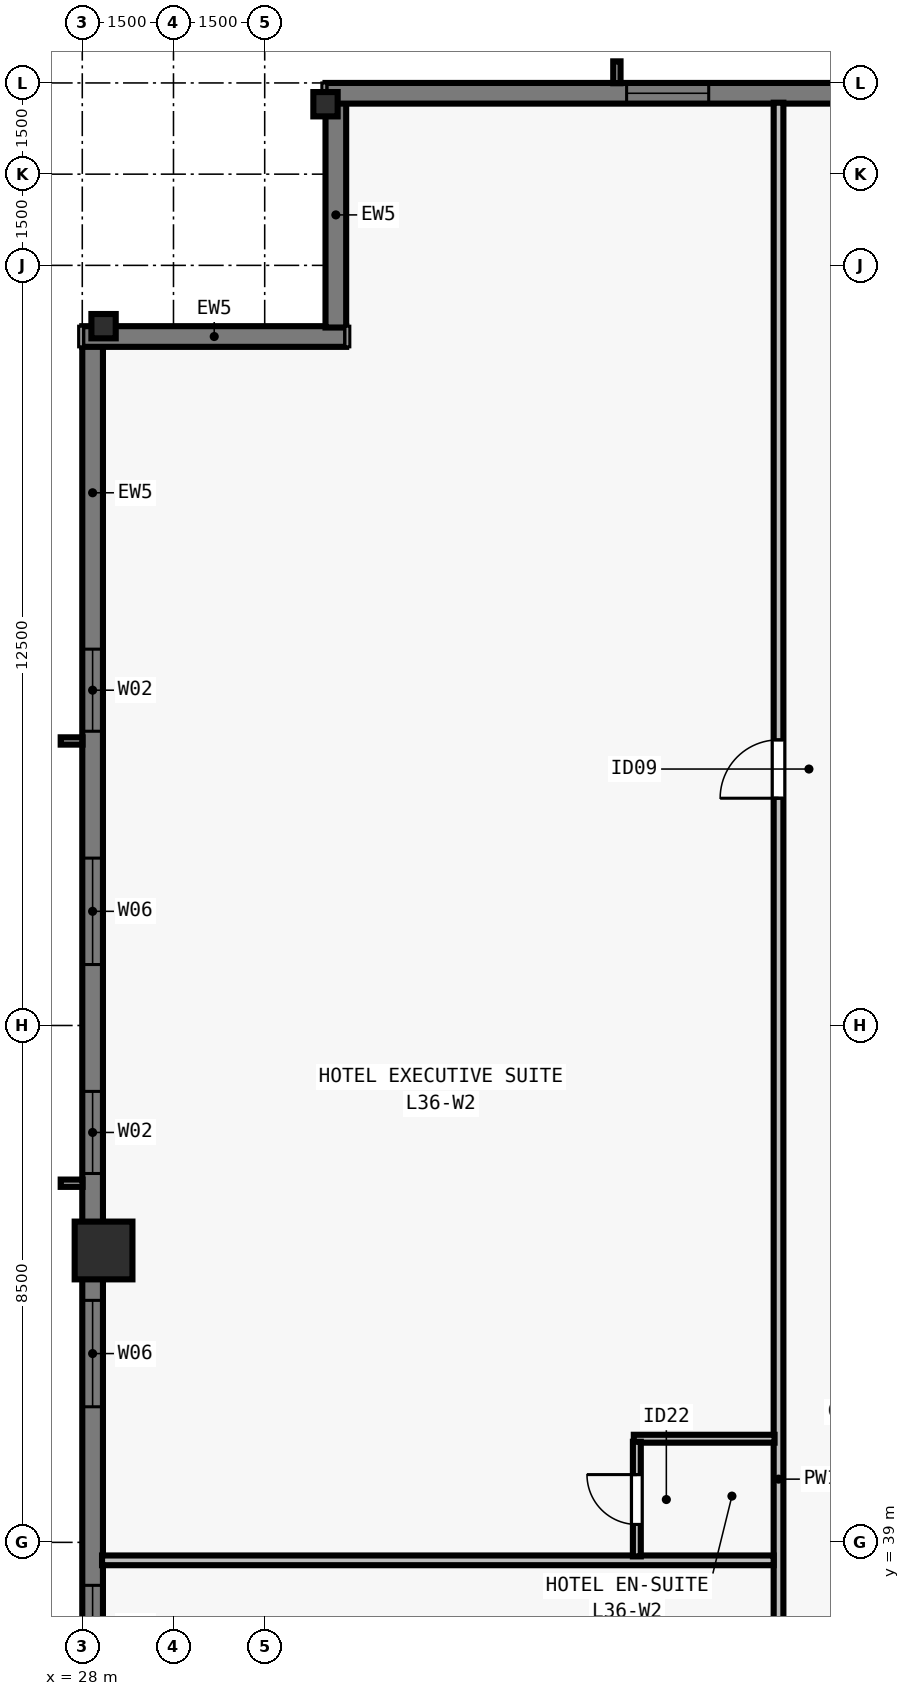
"""IFC4 building model, lengths in metres.
Left out: names, types, materials, properties, quantities, classifications, styles, units other than length and angle.
Written with IfcOpenShell. Run it as: python <this file> out.ifc"""

import sys

from ifc_helpers import new_model, si_unit, direction, frame, frame_2d, origin, origin_2d, place, context, subcontext, project, spatial, rectangle, i_section, extrude, element, fill, save


model = new_model("IFC4")
c1 = context("Model", 3, precision=1e-05, world=origin(), true_north=direction((0.0, 1.0)))
c2 = subcontext(c1, "Body", "Model", "MODEL_VIEW")
j1 = project(units=[si_unit("LENGTHUNIT", "METRE"), si_unit("PLANEANGLEUNIT", "RADIAN")], contexts=[c1])
p1 = place(None, origin())
s1 = spatial("IfcSite", under=j1, at=p1, CompositionType="ELEMENT")
p2 = place(p1, origin())
s2 = spatial("IfcBuilding", under=s1, at=p2, CompositionType="ELEMENT")
p3 = place(p2, frame((0.0, 0.0, 134.0)))
s3 = spatial("IfcBuildingStorey", under=s2, at=p3, CompositionType="ELEMENT", Elevation=134.0)
for number, where, z_axis, x_axis in (
    (1, (32.0, 62.65, 0.0), (0.0, 0.0, 1.0), (1.0, 0.0, 0.0)),
    (2, (28.35, 59.0, 0.0), (0.0, 0.0, 1.0), (0.0, 1.0, 0.0)),
):
    element("IfcColumn", number, at=place(p3, frame(where, z_axis=z_axis, x_axis=x_axis)), inside=s3, PredefinedType="COLUMN", context=c2, shape_type="SweptSolid", body=[
        extrude(i_section(OverallWidth=0.4, OverallDepth=0.4, WebThickness=0.022, FlangeThickness=0.036, at=origin_2d()), origin(), (0.0, 0.0, 1.0), 3.5),
    ])
p4 = place(p3, frame((28.35, 43.8, 0.0), z_axis=(0.0, 0.0, 1.0), x_axis=(0.0, 1.0, 0.0)))
e3 = element("IfcColumn", 3, at=p4, inside=s3, PredefinedType="COLUMN", context=c2, shape_type="SweptSolid", body=[
    extrude(rectangle(XDim=0.95, YDim=0.95, at=origin_2d()), origin(), (0.0, 0.0, 1.0), 3.5),
])
p5 = place(p3, frame((28.17, 32.8, 0.0), z_axis=(0.0, 0.0, 1.0), x_axis=(0.0, 1.0, 0.0)))
e4 = element("IfcWall", 4, at=p5, inside=s3, PredefinedType="SOLIDWALL", context=c2, shape_type="SweptSolid", body=[
    extrude(rectangle(XDim=25.882, YDim=0.34, at=frame_2d((12.941, 0.0))), origin(), (0.0, 0.0, 1.0), 3.28),
])
p6 = place(p5, frame((4.143, 0.0, 0.8)))
e5 = element("IfcOpeningElement", 5, at=p6, cuts=e4, PredefinedType="OPENING", context=c2, shape_type="SweptSolid", body=[
    extrude(rectangle(XDim=1.35, YDim=1.66, at=frame_2d((0.675, 0.83))), frame((0.0, 0.18, 0.0), z_axis=(0.0, -1.0, 0.0), x_axis=(1.0, 0.0, 0.0)), (0.0, 0.0, 1.0), 0.36),
])
p7 = place(p5, frame((8.43, 0.0, 0.8)))
e6 = element("IfcOpeningElement", 6, at=p7, cuts=e4, PredefinedType="OPENING", context=c2, shape_type="SweptSolid", body=[
    extrude(rectangle(XDim=1.75, YDim=1.66, at=frame_2d((0.875, 0.83))), frame((0.0, 0.18, 0.0), z_axis=(0.0, -1.0, 0.0), x_axis=(1.0, 0.0, 0.0)), (0.0, 0.0, 1.0), 0.36),
])
p8 = place(p5, frame((12.266, 0.0, 0.8)))
e7 = element("IfcOpeningElement", 7, at=p8, cuts=e4, PredefinedType="OPENING", context=c2, shape_type="SweptSolid", body=[
    extrude(rectangle(XDim=1.35, YDim=1.66, at=frame_2d((0.675, 0.83))), frame((0.0, 0.18, 0.0), z_axis=(0.0, -1.0, 0.0), x_axis=(1.0, 0.0, 0.0)), (0.0, 0.0, 1.0), 0.36),
])
p9 = place(p5, frame((15.702, 0.0, 0.8)))
e8 = element("IfcOpeningElement", 8, at=p9, cuts=e4, PredefinedType="OPENING", context=c2, shape_type="SweptSolid", body=[
    extrude(rectangle(XDim=1.75, YDim=1.66, at=frame_2d((0.875, 0.83))), frame((0.0, 0.18, 0.0), z_axis=(0.0, -1.0, 0.0), x_axis=(1.0, 0.0, 0.0)), (0.0, 0.0, 1.0), 0.36),
])
p10 = place(p5, frame((19.539, 0.0, 0.8)))
e9 = element("IfcOpeningElement", 9, at=p10, cuts=e4, PredefinedType="OPENING", context=c2, shape_type="SweptSolid", body=[
    extrude(rectangle(XDim=1.35, YDim=1.66, at=frame_2d((0.675, 0.83))), frame((0.0, 0.18, 0.0), z_axis=(0.0, -1.0, 0.0), x_axis=(1.0, 0.0, 0.0)), (0.0, 0.0, 1.0), 0.36),
])
p11 = place(p3, frame((28.0, 58.83, 0.0), z_axis=(0.0, 0.0, 1.0), x_axis=(1.0, 0.0, 0.0)))
e10 = element("IfcWall", 10, at=p11, inside=s3, PredefinedType="SOLIDWALL", context=c2, shape_type="SweptSolid", body=[
    extrude(rectangle(XDim=4.34, YDim=0.34, at=frame_2d((2.17, 0.0))), origin(), (0.0, 0.0, 1.0), 3.28),
])
p12 = place(p3, frame((32.17, 58.978, 0.0), z_axis=(0.0, 0.0, 1.0), x_axis=(0.0, 1.0, 0.0)))
e11 = element("IfcWall", 11, at=p12, inside=s3, PredefinedType="SOLIDWALL", context=c2, shape_type="SweptSolid", body=[
    extrude(rectangle(XDim=3.704, YDim=0.34, at=frame_2d((1.852, 0.0))), origin(), (0.0, 0.0, 1.0), 3.28),
])
p13 = place(p3, frame((32.0, 62.83, 0.0), z_axis=(0.0, 0.0, 1.0), x_axis=(1.0, 0.0, 0.0)))
e12 = element("IfcWall", 12, at=p13, inside=s3, PredefinedType="SOLIDWALL", context=c2, shape_type="SweptSolid", body=[
    extrude(rectangle(XDim=39.682, YDim=0.34, at=frame_2d((19.841, 0.0))), origin(), (0.0, 0.0, 1.0), 3.28),
])
p14 = place(p13, frame((4.952, 0.0, 0.8)))
e13 = element("IfcOpeningElement", 13, at=p14, cuts=e12, PredefinedType="OPENING", context=c2, shape_type="SweptSolid", body=[
    extrude(rectangle(XDim=1.35, YDim=1.66, at=frame_2d((0.675, 0.83))), frame((0.0, 0.18, 0.0), z_axis=(0.0, -1.0, 0.0), x_axis=(1.0, 0.0, 0.0)), (0.0, 0.0, 1.0), 0.36),
])
p15 = place(p13, frame((12.059, 0.0, 0.8)))
e14 = element("IfcOpeningElement", 14, at=p15, cuts=e12, PredefinedType="OPENING", context=c2, shape_type="SweptSolid", body=[
    extrude(rectangle(XDim=1.35, YDim=1.66, at=frame_2d((0.675, 0.83))), frame((0.0, 0.18, 0.0), z_axis=(0.0, -1.0, 0.0), x_axis=(1.0, 0.0, 0.0)), (0.0, 0.0, 1.0), 0.36),
])
p16 = place(p13, frame((16.262, 0.0, 0.8)))
e15 = element("IfcOpeningElement", 15, at=p16, cuts=e12, PredefinedType="OPENING", context=c2, shape_type="SweptSolid", body=[
    extrude(rectangle(XDim=1.75, YDim=1.66, at=frame_2d((0.875, 0.83))), frame((0.0, 0.18, 0.0), z_axis=(0.0, -1.0, 0.0), x_axis=(1.0, 0.0, 0.0)), (0.0, 0.0, 1.0), 0.36),
])
p17 = place(p13, frame((19.166, 0.0, 0.8)))
e16 = element("IfcOpeningElement", 16, at=p17, cuts=e12, PredefinedType="OPENING", context=c2, shape_type="SweptSolid", body=[
    extrude(rectangle(XDim=1.35, YDim=1.66, at=frame_2d((0.675, 0.83))), frame((0.0, 0.18, 0.0), z_axis=(0.0, -1.0, 0.0), x_axis=(1.0, 0.0, 0.0)), (0.0, 0.0, 1.0), 0.36),
])
p18 = place(p13, frame((22.07, 0.0, 0.8)))
e17 = element("IfcOpeningElement", 17, at=p18, cuts=e12, PredefinedType="OPENING", context=c2, shape_type="SweptSolid", body=[
    extrude(rectangle(XDim=1.75, YDim=1.66, at=frame_2d((0.875, 0.83))), frame((0.0, 0.18, 0.0), z_axis=(0.0, -1.0, 0.0), x_axis=(1.0, 0.0, 0.0)), (0.0, 0.0, 1.0), 0.36),
])
p19 = place(p13, frame((26.273, 0.0, 0.8)))
e18 = element("IfcOpeningElement", 18, at=p19, cuts=e12, PredefinedType="OPENING", context=c2, shape_type="SweptSolid", body=[
    extrude(rectangle(XDim=1.35, YDim=1.66, at=frame_2d((0.675, 0.83))), frame((0.0, 0.18, 0.0), z_axis=(0.0, -1.0, 0.0), x_axis=(1.0, 0.0, 0.0)), (0.0, 0.0, 1.0), 0.36),
])
p20 = place(p13, frame((29.627, 0.0, 0.8)))
e19 = element("IfcOpeningElement", 19, at=p20, cuts=e12, PredefinedType="OPENING", context=c2, shape_type="SweptSolid", body=[
    extrude(rectangle(XDim=1.75, YDim=1.66, at=frame_2d((0.875, 0.83))), frame((0.0, 0.18, 0.0), z_axis=(0.0, -1.0, 0.0), x_axis=(1.0, 0.0, 0.0)), (0.0, 0.0, 1.0), 0.36),
])
p21 = place(p13, frame((34.23, 0.0, 0.8)))
e20 = element("IfcOpeningElement", 20, at=p21, cuts=e12, PredefinedType="OPENING", context=c2, shape_type="SweptSolid", body=[
    extrude(rectangle(XDim=1.35, YDim=1.66, at=frame_2d((0.675, 0.83))), frame((0.0, 0.18, 0.0), z_axis=(0.0, -1.0, 0.0), x_axis=(1.0, 0.0, 0.0)), (0.0, 0.0, 1.0), 0.36),
])
p22 = place(p3, frame((39.45, 15.325, 0.0), z_axis=(0.0, 0.0, 1.0), x_axis=(0.0, 1.0, 0.0)))
e21 = element("IfcWall", 21, at=p22, inside=s3, PredefinedType="PARTITIONING", context=c2, shape_type="SweptSolid", body=[
    extrude(rectangle(XDim=47.35, YDim=0.16, at=frame_2d((23.675, 0.0))), origin(), (0.0, 0.0, 1.0), 2.555),
])
p23 = place(p22, frame((12.557, 0.0, 0.0)))
e22 = element("IfcOpeningElement", 22, at=p23, cuts=e21, PredefinedType="OPENING", context=c2, shape_type="SweptSolid", body=[
    extrude(rectangle(XDim=0.96, YDim=2.15, at=frame_2d((0.48, 1.075))), frame((0.0, 0.09, 0.0), z_axis=(0.0, -1.0, 0.0), x_axis=(1.0, 0.0, 0.0)), (0.0, 0.0, 1.0), 0.18),
])
p24 = place(p22, frame((35.912, 0.0, 0.0)))
e23 = element("IfcOpeningElement", 23, at=p24, cuts=e21, PredefinedType="OPENING", context=c2, shape_type="SweptSolid", body=[
    extrude(rectangle(XDim=0.96, YDim=2.15, at=frame_2d((0.48, 1.075))), frame((0.0, 0.09, 0.0), z_axis=(0.0, -1.0, 0.0), x_axis=(1.0, 0.0, 0.0)), (0.0, 0.0, 1.0), 0.18),
])
p25 = place(p3, frame((28.325, 38.704, 0.0), z_axis=(0.0, 0.0, 1.0), x_axis=(1.0, 0.0, 0.0)))
e24 = element("IfcWall", 24, at=p25, inside=s3, PredefinedType="PARTITIONING", context=c2, shape_type="SweptSolid", body=[
    extrude(rectangle(XDim=11.045, YDim=0.16, at=frame_2d((5.522, 0.0))), origin(), (0.0, 0.0, 1.0), 2.896),
])
p26 = place(p3, frame((37.07, 40.704, 0.0), z_axis=(0.0, 0.0, 1.0), x_axis=(1.0, 0.0, 0.0)))
e25 = element("IfcWall", 25, at=p26, inside=s3, PredefinedType="PLUMBINGWALL", context=c2, shape_type="SweptSolid", body=[
    extrude(rectangle(XDim=2.315, YDim=0.13, at=frame_2d((1.157, 0.0))), origin(), (0.0, 0.0, 1.0), 3.28),
])
p27 = place(p3, frame((37.12, 38.769, 0.0), z_axis=(0.0, 0.0, 1.0), x_axis=(0.0, 1.0, 0.0)))
e26 = element("IfcWall", 26, at=p27, inside=s3, PredefinedType="PLUMBINGWALL", context=c2, shape_type="SweptSolid", body=[
    extrude(rectangle(XDim=1.885, YDim=0.13, at=frame_2d((0.942, 0.0))), origin(), (0.0, 0.0, 1.0), 3.28),
])
p28 = place(p27, frame((0.525, 0.0, 0.0)))
e27 = element("IfcOpeningElement", 27, at=p28, cuts=e26, PredefinedType="OPENING", context=c2, shape_type="SweptSolid", body=[
    extrude(rectangle(XDim=0.82, YDim=2.1, at=frame_2d((0.41, 1.05))), frame((0.0, 0.075, 0.0), z_axis=(0.0, -1.0, 0.0), x_axis=(1.0, 0.0, 0.0)), (0.0, 0.0, 1.0), 0.15),
])
p29 = place(p6, origin())
e28 = element("IfcWindow", 28, at=p29, inside=s3, PartitioningType="SINGLE_PANEL", PredefinedType="WINDOW", context=c2, shape_type="SweptSolid", body=[
    extrude(rectangle(XDim=1.35, YDim=1.66, at=frame_2d((0.675, 0.83))), frame((0.0, -0.05, 0.0), z_axis=(0.0, -1.0, 0.0), x_axis=(1.0, 0.0, 0.0)), (0.0, 0.0, 1.0), 0.06),
])
fill(e5, e28)
p30 = place(p7, origin())
e29 = element("IfcWindow", 29, at=p30, inside=s3, PartitioningType="SINGLE_PANEL", PredefinedType="WINDOW", context=c2, shape_type="SweptSolid", body=[
    extrude(rectangle(XDim=1.75, YDim=1.66, at=frame_2d((0.875, 0.83))), frame((0.0, -0.05, 0.0), z_axis=(0.0, -1.0, 0.0), x_axis=(1.0, 0.0, 0.0)), (0.0, 0.0, 1.0), 0.06),
])
fill(e6, e29)
p31 = place(p8, origin())
e30 = element("IfcWindow", 30, at=p31, inside=s3, PartitioningType="SINGLE_PANEL", PredefinedType="WINDOW", context=c2, shape_type="SweptSolid", body=[
    extrude(rectangle(XDim=1.35, YDim=1.66, at=frame_2d((0.675, 0.83))), frame((0.0, -0.05, 0.0), z_axis=(0.0, -1.0, 0.0), x_axis=(1.0, 0.0, 0.0)), (0.0, 0.0, 1.0), 0.06),
])
fill(e7, e30)
p32 = place(p9, origin())
e31 = element("IfcWindow", 31, at=p32, inside=s3, PartitioningType="SINGLE_PANEL", PredefinedType="WINDOW", context=c2, shape_type="SweptSolid", body=[
    extrude(rectangle(XDim=1.75, YDim=1.66, at=frame_2d((0.875, 0.83))), frame((0.0, -0.05, 0.0), z_axis=(0.0, -1.0, 0.0), x_axis=(1.0, 0.0, 0.0)), (0.0, 0.0, 1.0), 0.06),
])
fill(e8, e31)
p33 = place(p10, origin())
e32 = element("IfcWindow", 32, at=p33, inside=s3, PartitioningType="SINGLE_PANEL", PredefinedType="WINDOW", context=c2, shape_type="SweptSolid", body=[
    extrude(rectangle(XDim=1.35, YDim=1.66, at=frame_2d((0.675, 0.83))), frame((0.0, -0.05, 0.0), z_axis=(0.0, -1.0, 0.0), x_axis=(1.0, 0.0, 0.0)), (0.0, 0.0, 1.0), 0.06),
])
fill(e9, e32)
p34 = place(p14, origin())
e33 = element("IfcWindow", 33, at=p34, inside=s3, PartitioningType="SINGLE_PANEL", PredefinedType="WINDOW", context=c2, shape_type="SweptSolid", body=[
    extrude(rectangle(XDim=1.35, YDim=1.66, at=frame_2d((0.675, 0.83))), frame((0.0, -0.05, 0.0), z_axis=(0.0, -1.0, 0.0), x_axis=(1.0, 0.0, 0.0)), (0.0, 0.0, 1.0), 0.06),
])
fill(e13, e33)
p35 = place(p28, origin())
e34 = element("IfcDoor", 34, at=p35, inside=s3, OperationType="SINGLE_SWING_RIGHT", PredefinedType="DOOR", context=c2, shape_type="SweptSolid", body=[
    extrude(rectangle(XDim=0.82, YDim=2.1, at=frame_2d((0.41, 1.05))), frame((0.0, 0.025, 0.0), z_axis=(0.0, -1.0, 0.0), x_axis=(1.0, 0.0, 0.0)), (0.0, 0.0, 1.0), 0.05),
])
fill(e27, e34)
p36 = place(p24, origin())
e35 = element("IfcDoor", 35, at=p36, inside=s3, OperationType="SINGLE_SWING_LEFT", PredefinedType="DOOR", context=c2, shape_type="SweptSolid", body=[
    extrude(rectangle(XDim=0.96, YDim=2.15, at=frame_2d((0.48, 1.075))), frame((0.0, 0.025, 0.0), z_axis=(0.0, -1.0, 0.0), x_axis=(1.0, 0.0, 0.0)), (0.0, 0.0, 1.0), 0.05),
])
fill(e23, e35)
save(model, sys.argv[1])
